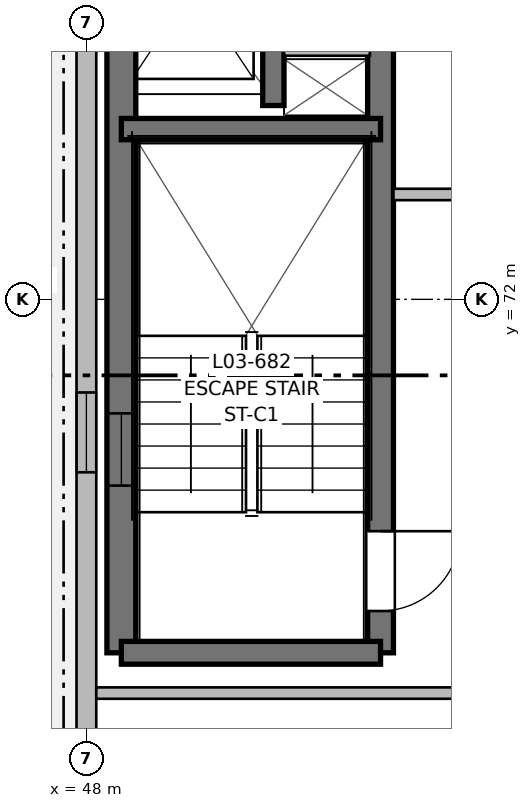
"""IFC4 building model, lengths in metres.
Left out: names, types, materials, properties, quantities, classifications, styles, units other than length and angle.
Written with IfcOpenShell. Run it as: python <this file> out.ifc"""

import sys

from ifc_helpers import new_model, si_unit, direction, frame, frame_2d, origin, place, context, subcontext, project, spatial, rectangle, extrude, element, fill, save


model = new_model("IFC4")
c1 = context("Model", 3, precision=1e-05, world=origin(), true_north=direction((0.0, 1.0)))
c2 = subcontext(c1, "Body", "Model", "MODEL_VIEW")
j1 = project(units=[si_unit("LENGTHUNIT", "METRE"), si_unit("PLANEANGLEUNIT", "RADIAN")], contexts=[c1])
p1 = place(None, origin())
s1 = spatial("IfcSite", under=j1, at=p1, CompositionType="ELEMENT")
p2 = place(p1, origin())
s2 = spatial("IfcBuilding", under=s1, at=p2, CompositionType="ELEMENT")
p3 = place(p2, frame((0.0, 0.0, 10.56)))
s3 = spatial("IfcBuildingStorey", under=s2, at=p3, CompositionType="ELEMENT", Elevation=10.56)
p4 = place(p3, frame((48.46, 67.35, 0.0), z_axis=(0.0, 0.0, 1.0), x_axis=(0.0, 1.0, 0.0)))
e1 = element("IfcWall", 1, at=p4, inside=s3, PredefinedType="SHEAR", context=c2, shape_type="SweptSolid", body=[
    extrude(rectangle(XDim=12.45, YDim=0.38, at=frame_2d((6.225, 0.0))), origin(), (0.0, 0.0, 1.0), 3.2),
])
p5 = place(p4, frame((2.2, 0.0, 0.97)))
e2 = element("IfcOpeningElement", 2, at=p5, cuts=e1, PredefinedType="OPENING", context=c2, shape_type="SweptSolid", body=[
    extrude(rectangle(XDim=0.95, YDim=1.25, at=frame_2d((0.475, 0.625))), frame((0.0, 0.2, 0.0), z_axis=(0.0, -1.0, 0.0), x_axis=(1.0, 0.0, 0.0)), (0.0, 0.0, 1.0), 0.4),
])
p6 = place(p3, frame((51.87, 79.8, 0.0), z_axis=(0.0, 0.0, 1.0), x_axis=(0.0, -1.0, 0.0)))
e3 = element("IfcWall", 3, at=p6, inside=s3, PredefinedType="SHEAR", context=c2, shape_type="SweptSolid", body=[
    extrude(rectangle(XDim=12.45, YDim=0.34, at=frame_2d((6.225, 0.0))), origin(), (0.0, 0.0, 1.0), 3.2),
])
p7 = place(p6, frame((10.85, 0.0, 0.0)))
e4 = element("IfcOpeningElement", 4, at=p7, cuts=e3, PredefinedType="OPENING", context=c2, shape_type="SweptSolid", body=[
    extrude(rectangle(XDim=1.05, YDim=2.15, at=frame_2d((0.525, 1.075))), frame((0.0, 0.18, 0.0), z_axis=(0.0, -1.0, 0.0), x_axis=(1.0, 0.0, 0.0)), (0.0, 0.0, 1.0), 0.36),
])
p8 = place(p3, frame((51.87, 67.35, 0.0), z_axis=(0.0, 0.0, 1.0), x_axis=(-1.0, 0.0, 0.0)))
e5 = element("IfcWall", 5, at=p8, inside=s3, PredefinedType="SHEAR", context=c2, shape_type="SweptSolid", body=[
    extrude(rectangle(XDim=3.41, YDim=0.3, at=frame_2d((1.705, 0.0))), origin(), (0.0, 0.0, 1.0), 3.2),
])
p9 = place(p3, frame((48.46, 74.24, 0.0), z_axis=(0.0, 0.0, 1.0), x_axis=(1.0, 0.0, 0.0)))
e6 = element("IfcWall", 6, at=p9, inside=s3, PredefinedType="SHEAR", context=c2, shape_type="SweptSolid", body=[
    extrude(rectangle(XDim=3.41, YDim=0.28, at=frame_2d((1.705, 0.0))), origin(), (0.0, 0.0, 1.0), 3.2),
])
p10 = place(p3, frame((50.46, 74.55, 0.0), z_axis=(0.0, 0.0, 1.0), x_axis=(0.0, 1.0, 0.0)))
e7 = element("IfcWall", 7, at=p10, inside=s3, PredefinedType="SHEAR", context=c2, shape_type="SweptSolid", body=[
    extrude(rectangle(XDim=5.25, YDim=0.28, at=frame_2d((2.625, 0.0))), origin(), (0.0, 0.0, 1.0), 3.2),
])
p11 = place(p10, frame((1.15, 0.0, 0.0)))
e8 = element("IfcOpeningElement", 8, at=p11, cuts=e7, PredefinedType="OPENING", context=c2, shape_type="SweptSolid", body=[
    extrude(rectangle(XDim=1.0, YDim=2.15, at=frame_2d((0.5, 1.075))), frame((0.0, 0.15, 0.0), z_axis=(0.0, -1.0, 0.0), x_axis=(1.0, 0.0, 0.0)), (0.0, 0.0, 1.0), 0.3),
])
p12 = place(p10, frame((3.85, 0.0, 0.0)))
e9 = element("IfcOpeningElement", 9, at=p12, cuts=e7, PredefinedType="OPENING", context=c2, shape_type="SweptSolid", body=[
    extrude(rectangle(XDim=0.9, YDim=2.15, at=frame_2d((0.45, 1.075))), frame((0.0, 0.15, 0.0), z_axis=(0.0, -1.0, 0.0), x_axis=(1.0, 0.0, 0.0)), (0.0, 0.0, 1.0), 0.3),
])
p13 = place(p3, frame((50.6, 75.28, 0.0), z_axis=(0.0, 0.0, 1.0), x_axis=(1.0, 0.0, 0.0)))
e10 = element("IfcWall", 10, at=p13, inside=s3, PredefinedType="PARTITIONING", context=c2, shape_type="SweptSolid", body=[
    extrude(rectangle(XDim=1.13, YDim=0.15, at=frame_2d((0.565, 0.0))), origin(), (0.0, 0.0, 1.0), 2.95),
])
p14 = place(p3, frame((48.0, 56.0, 0.0), z_axis=(0.0, 0.0, 1.0), x_axis=(0.0, 1.0, 0.0)))
e11 = element("IfcWall", 11, at=p14, inside=s3, PredefinedType="SOLIDWALL", context=c2, shape_type="SweptSolid", body=[
    extrude(rectangle(XDim=38.0, YDim=0.26, at=frame_2d((19.0, 0.0))), origin(), (0.0, 0.0, 1.0), 2.98),
])
p15 = place(p14, frame((4.95, 0.0, 0.0)))
e12 = element("IfcOpeningElement", 12, at=p15, cuts=e11, PredefinedType="OPENING", context=c2, shape_type="SweptSolid", body=[
    extrude(rectangle(XDim=1.2, YDim=2.2, at=frame_2d((0.6, 1.1))), frame((0.0, 0.14, 0.0), z_axis=(0.0, -1.0, 0.0), x_axis=(1.0, 0.0, 0.0)), (0.0, 0.0, 1.0), 0.28),
])
p16 = place(p14, frame((13.725, 0.0, 0.9)))
e13 = element("IfcOpeningElement", 13, at=p16, cuts=e11, PredefinedType="OPENING", context=c2, shape_type="SweptSolid", body=[
    extrude(rectangle(XDim=1.05, YDim=1.15, at=frame_2d((0.525, 0.575))), frame((0.0, 0.14, 0.0), z_axis=(0.0, -1.0, 0.0), x_axis=(1.0, 0.0, 0.0)), (0.0, 0.0, 1.0), 0.28),
])
p17 = place(p14, frame((24.0, 0.0, 0.9)))
e14 = element("IfcOpeningElement", 14, at=p17, cuts=e11, PredefinedType="OPENING", context=c2, shape_type="SweptSolid", body=[
    extrude(rectangle(XDim=1.2, YDim=1.05, at=frame_2d((0.6, 0.525))), frame((0.0, 0.14, 0.0), z_axis=(0.0, -1.0, 0.0), x_axis=(1.0, 0.0, 0.0)), (0.0, 0.0, 1.0), 0.28),
])
p18 = place(p14, frame((32.925, 0.0, 0.9)))
e15 = element("IfcOpeningElement", 15, at=p18, cuts=e11, PredefinedType="OPENING", context=c2, shape_type="SweptSolid", body=[
    extrude(rectangle(XDim=0.65, YDim=0.95, at=frame_2d((0.325, 0.475))), frame((0.0, 0.14, 0.0), z_axis=(0.0, -1.0, 0.0), x_axis=(1.0, 0.0, 0.0)), (0.0, 0.0, 1.0), 0.28),
])
p19 = place(p3, frame((48.13, 66.82, 0.0), z_axis=(0.0, 0.0, 1.0), x_axis=(1.0, 0.0, 0.0)))
e16 = element("IfcWall", 16, at=p19, inside=s3, PredefinedType="PARTITIONING", context=c2, shape_type="SweptSolid", body=[
    extrude(rectangle(XDim=6.59, YDim=0.15, at=frame_2d((3.295, 0.0))), origin(), (0.0, 0.0, 1.0), 2.935),
])
p20 = place(p3, frame((52.04, 73.38, 0.0), z_axis=(0.0, 0.0, 1.0), x_axis=(1.0, 0.0, 0.0)))
e17 = element("IfcWall", 17, at=p20, inside=s3, PredefinedType="PARTITIONING", context=c2, shape_type="SweptSolid", body=[
    extrude(rectangle(XDim=2.68, YDim=0.15, at=frame_2d((1.34, 0.0))), origin(), (0.0, 0.0, 1.0), 2.935),
])
p21 = place(p7, origin())
e18 = element("IfcDoor", 18, at=p21, inside=s3, OperationType="SINGLE_SWING_LEFT", PredefinedType="DOOR", context=c2, shape_type="SweptSolid", body=[
    extrude(rectangle(XDim=1.05, YDim=2.15, at=frame_2d((0.525, 1.075))), frame((0.0, 0.025, 0.0), z_axis=(0.0, -1.0, 0.0), x_axis=(1.0, 0.0, 0.0)), (0.0, 0.0, 1.0), 0.05),
])
fill(e4, e18)
p22 = place(p5, origin())
e19 = element("IfcWindow", 19, at=p22, inside=s3, PartitioningType="SINGLE_PANEL", PredefinedType="WINDOW", context=c2, shape_type="SweptSolid", body=[
    extrude(rectangle(XDim=0.95, YDim=1.25, at=frame_2d((0.475, 0.625))), frame((0.0, 0.03, 0.0), z_axis=(0.0, -1.0, 0.0), x_axis=(1.0, 0.0, 0.0)), (0.0, 0.0, 1.0), 0.06),
])
fill(e2, e19)
p23 = place(p16, origin())
e20 = element("IfcWindow", 20, at=p23, inside=s3, PartitioningType="SINGLE_PANEL", PredefinedType="WINDOW", context=c2, shape_type="SweptSolid", body=[
    extrude(rectangle(XDim=1.05, YDim=1.15, at=frame_2d((0.525, 0.575))), frame((0.0, 0.03, 0.0), z_axis=(0.0, -1.0, 0.0), x_axis=(1.0, 0.0, 0.0)), (0.0, 0.0, 1.0), 0.06),
])
fill(e13, e20)
save(model, sys.argv[1])
